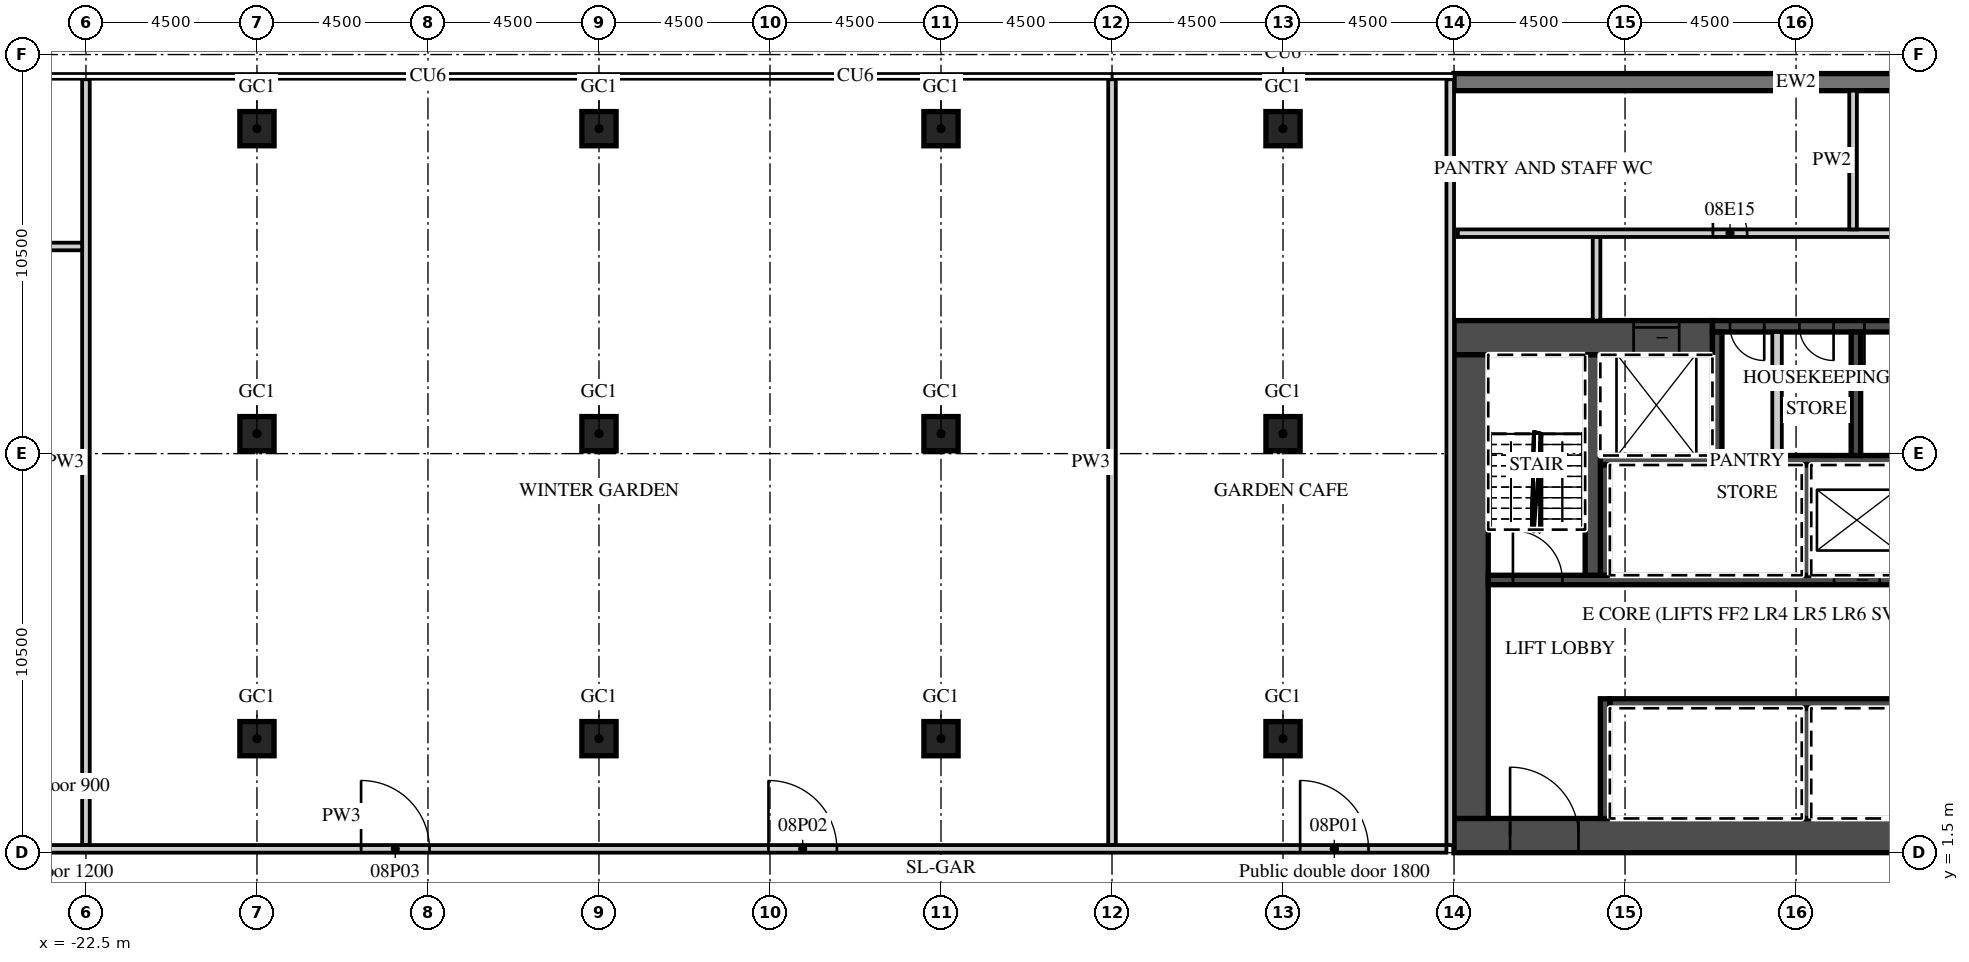
"""IFC4 building model, lengths in metres.
Left out: names, types, materials, properties, quantities, classifications, styles, units other than length and angle.
Written with IfcOpenShell. Run it as: python <this file> out.ifc"""

import sys

from ifc_helpers import new_model, si_unit, direction, frame, frame_2d, origin, origin_2d, place, context, subcontext, project, spatial, rectangle, extrude, element, fill, save


model = new_model("IFC4")
c1 = context("Model", 3, precision=1e-05, world=origin(), true_north=direction((0.0, 1.0)))
c2 = subcontext(c1, "Body", "Model", "MODEL_VIEW")
j1 = project(units=[si_unit("LENGTHUNIT", "METRE"), si_unit("PLANEANGLEUNIT", "RADIAN")], contexts=[c1])
p1 = place(None, origin())
s1 = spatial("IfcSite", under=j1, at=p1, CompositionType="ELEMENT")
p2 = place(p1, origin())
s2 = spatial("IfcBuilding", under=s1, at=p2, CompositionType="ELEMENT")
p3 = place(p2, frame((0.0, 0.0, 53.0)))
s3 = spatial("IfcBuildingStorey", under=s2, at=p3, CompositionType="ELEMENT", Elevation=53.0)
for number, where, z_axis, x_axis in (
    (1, (-18.0, 4.5, 0.0), (0.0, 0.0, 1.0), (1.0, 0.0, 0.0)),
    (2, (-18.0, 12.525, 0.0), (0.0, 0.0, 1.0), (1.0, 0.0, 0.0)),
    (3, (-18.0, 20.55, 0.0), (0.0, 0.0, 1.0), (1.0, 0.0, 0.0)),
    (4, (-9.0, 4.5, 0.0), (0.0, 0.0, 1.0), (1.0, 0.0, 0.0)),
    (5, (-9.0, 12.525, 0.0), (0.0, 0.0, 1.0), (1.0, 0.0, 0.0)),
    (6, (-9.0, 20.55, 0.0), (0.0, 0.0, 1.0), (1.0, 0.0, 0.0)),
    (7, (0.0, 4.5, 0.0), (0.0, 0.0, 1.0), (1.0, 0.0, 0.0)),
    (8, (0.0, 12.525, 0.0), (0.0, 0.0, 1.0), (1.0, 0.0, 0.0)),
    (9, (0.0, 20.55, 0.0), (0.0, 0.0, 1.0), (1.0, 0.0, 0.0)),
    (10, (9.0, 4.5, 0.0), (0.0, 0.0, 1.0), (1.0, 0.0, 0.0)),
    (11, (9.0, 12.525, 0.0), (0.0, 0.0, 1.0), (1.0, 0.0, 0.0)),
    (12, (9.0, 20.55, 0.0), (0.0, 0.0, 1.0), (1.0, 0.0, 0.0)),
):
    element("IfcColumn", number, at=place(p3, frame(where, z_axis=z_axis, x_axis=x_axis)), inside=s3, PredefinedType="COLUMN", context=c2, shape_type="SweptSolid", body=[
        extrude(rectangle(XDim=0.9, YDim=0.9, at=origin_2d()), origin(), (0.0, 0.0, 1.0), 5.72),
    ])
p4 = place(p3, frame((31.5, 21.775, 0.0), z_axis=(0.0, 0.0, 1.0), x_axis=(-1.0, 0.0, 0.0)))
e13 = element("IfcWall", 13, at=p4, inside=s3, PredefinedType="SOLIDWALL", context=c2, shape_type="SweptSolid", body=[
    extrude(rectangle(XDim=18.0, YDim=0.45, at=frame_2d((9.0, 0.0))), origin(), (0.0, 0.0, 1.0), 6.72),
])
p5 = place(p3, frame((13.5, 1.95, 0.0), z_axis=(0.0, 0.0, 1.0), x_axis=(1.0, 0.0, 0.0)))
e14 = element("IfcWall", 14, at=p5, inside=s3, PredefinedType="SHEAR", context=c2, shape_type="SweptSolid", body=[
    extrude(rectangle(XDim=18.0, YDim=0.9, at=frame_2d((9.0, 0.0))), origin(), (0.0, 0.0, 1.0), 6.72),
])
p6 = place(p5, frame((1.475, 0.0, 0.0)))
e15 = element("IfcOpeningElement", 15, at=p6, cuts=e14, PredefinedType="OPENING", context=c2, shape_type="SweptSolid", body=[
    extrude(rectangle(XDim=1.8, YDim=2.1, at=frame_2d((0.9, 1.05))), frame((0.0, 0.46, 0.0), z_axis=(0.0, -1.0, 0.0), x_axis=(1.0, 0.0, 0.0)), (0.0, 0.0, 1.0), 0.92),
])
p7 = place(p3, frame((13.5, 15.05, 0.0), z_axis=(0.0, 0.0, 1.0), x_axis=(1.0, 0.0, 0.0)))
e16 = element("IfcWall", 16, at=p7, inside=s3, PredefinedType="SHEAR", context=c2, shape_type="SweptSolid", body=[
    extrude(rectangle(XDim=6.8, YDim=0.9, at=frame_2d((3.4, 0.0))), origin(), (0.0, 0.0, 1.0), 6.72),
])
p8 = place(p7, frame((4.725, 0.0, 0.0)))
e17 = element("IfcOpeningElement", 17, at=p8, cuts=e16, PredefinedType="OPENING", context=c2, shape_type="SweptSolid", body=[
    extrude(rectangle(XDim=1.2, YDim=2.1, at=frame_2d((0.6, 1.05))), frame((0.0, 0.46, 0.0), z_axis=(0.0, -1.0, 0.0), x_axis=(1.0, 0.0, 0.0)), (0.0, 0.0, 1.0), 0.92),
])
p9 = place(p3, frame((20.3, 15.35, 0.0), z_axis=(0.0, 0.0, 1.0), x_axis=(1.0, 0.0, 0.0)))
e18 = element("IfcWall", 18, at=p9, inside=s3, PredefinedType="SHEAR", context=c2, shape_type="SweptSolid", body=[
    extrude(rectangle(XDim=10.3, YDim=0.3, at=frame_2d((5.15, 0.0))), origin(), (0.0, 0.0, 1.0), 6.72),
])
p10 = place(p9, frame((4.0, 0.0, 0.0)))
e19 = element("IfcOpeningElement", 19, at=p10, cuts=e18, PredefinedType="OPENING", context=c2, shape_type="SweptSolid", body=[
    extrude(rectangle(XDim=1.3, YDim=2.1, at=frame_2d((0.65, 1.05))), frame((0.0, 0.16, 0.0), z_axis=(0.0, -1.0, 0.0), x_axis=(1.0, 0.0, 0.0)), (0.0, 0.0, 1.0), 0.32),
])
p11 = place(p9, frame((2.288, 0.0, 0.0)))
e20 = element("IfcOpeningElement", 20, at=p11, cuts=e18, PredefinedType="OPENING", context=c2, shape_type="SweptSolid", body=[
    extrude(rectangle(XDim=0.9, YDim=2.1, at=frame_2d((0.45, 1.05))), frame((0.0, 0.16, 0.0), z_axis=(0.0, -1.0, 0.0), x_axis=(1.0, 0.0, 0.0)), (0.0, 0.0, 1.0), 0.32),
])
p12 = place(p9, frame((0.462, 0.0, 0.0)))
e21 = element("IfcOpeningElement", 21, at=p12, cuts=e18, PredefinedType="OPENING", context=c2, shape_type="SweptSolid", body=[
    extrude(rectangle(XDim=0.9, YDim=2.1, at=frame_2d((0.45, 1.05))), frame((0.0, 0.16, 0.0), z_axis=(0.0, -1.0, 0.0), x_axis=(1.0, 0.0, 0.0)), (0.0, 0.0, 1.0), 0.32),
])
p13 = place(p3, frame((13.95, 2.4, 0.0), z_axis=(0.0, 0.0, 1.0), x_axis=(0.0, 1.0, 0.0)))
e22 = element("IfcWall", 22, at=p13, inside=s3, PredefinedType="SHEAR", context=c2, shape_type="SweptSolid", body=[
    extrude(rectangle(XDim=12.2, YDim=0.9, at=frame_2d((6.1, 0.0))), origin(), (0.0, 0.0, 1.0), 6.72),
])
p14 = place(p3, frame((17.6, 5.425, 0.0), z_axis=(0.0, 0.0, 1.0), x_axis=(1.0, 0.0, 0.0)))
e23 = element("IfcWall", 23, at=p14, inside=s3, PredefinedType="SHEAR", context=c2, shape_type="SweptSolid", body=[
    extrude(rectangle(XDim=13.0, YDim=0.25, at=frame_2d((6.5, 0.0))), origin(), (0.0, 0.0, 1.0), 6.72),
])
p15 = place(p3, frame((17.475, 2.4, 0.0), z_axis=(0.0, 0.0, 1.0), x_axis=(0.0, 1.0, 0.0)))
e24 = element("IfcWall", 24, at=p15, inside=s3, PredefinedType="SHEAR", context=c2, shape_type="SweptSolid", body=[
    extrude(rectangle(XDim=3.15, YDim=0.25, at=frame_2d((1.575, 0.0))), origin(), (0.0, 0.0, 1.0), 6.72),
])
p16 = place(p3, frame((22.775, 2.4, 0.0), z_axis=(0.0, 0.0, 1.0), x_axis=(0.0, 1.0, 0.0)))
e25 = element("IfcWall", 25, at=p16, inside=s3, PredefinedType="SHEAR", context=c2, shape_type="SweptSolid", body=[
    extrude(rectangle(XDim=2.9, YDim=0.25, at=frame_2d((1.45, 0.0))), origin(), (0.0, 0.0, 1.0), 6.72),
])
p17 = place(p3, frame((14.4, 8.675, 0.0), z_axis=(0.0, 0.0, 1.0), x_axis=(1.0, 0.0, 0.0)))
e26 = element("IfcWall", 26, at=p17, inside=s3, PredefinedType="SHEAR", context=c2, shape_type="SweptSolid", body=[
    extrude(rectangle(XDim=16.2, YDim=0.25, at=frame_2d((8.1, 0.0))), origin(), (0.0, 0.0, 1.0), 6.72),
])
p18 = place(p17, frame((14.4, 0.0, 0.0)))
e27 = element("IfcOpeningElement", 27, at=p18, cuts=e26, PredefinedType="OPENING", context=c2, shape_type="SweptSolid", body=[
    extrude(rectangle(XDim=1.2, YDim=2.1, at=frame_2d((0.6, 1.05))), frame((0.0, 0.135, 0.0), z_axis=(0.0, -1.0, 0.0), x_axis=(1.0, 0.0, 0.0)), (0.0, 0.0, 1.0), 0.27),
])
p19 = place(p17, frame((11.75, 0.0, 0.0)))
e28 = element("IfcOpeningElement", 28, at=p19, cuts=e26, PredefinedType="OPENING", context=c2, shape_type="SweptSolid", body=[
    extrude(rectangle(XDim=1.2, YDim=2.1, at=frame_2d((0.6, 1.05))), frame((0.0, 0.135, 0.0), z_axis=(0.0, -1.0, 0.0), x_axis=(1.0, 0.0, 0.0)), (0.0, 0.0, 1.0), 0.27),
])
p20 = place(p17, frame((9.1, 0.0, 0.0)))
e29 = element("IfcOpeningElement", 29, at=p20, cuts=e26, PredefinedType="OPENING", context=c2, shape_type="SweptSolid", body=[
    extrude(rectangle(XDim=1.2, YDim=2.1, at=frame_2d((0.6, 1.05))), frame((0.0, 0.135, 0.0), z_axis=(0.0, -1.0, 0.0), x_axis=(1.0, 0.0, 0.0)), (0.0, 0.0, 1.0), 0.27),
])
p21 = place(p17, frame((0.65, 0.0, 0.0)))
e30 = element("IfcOpeningElement", 30, at=p21, cuts=e26, PredefinedType="OPENING", context=c2, shape_type="SweptSolid", body=[
    extrude(rectangle(XDim=1.3, YDim=2.1, at=frame_2d((0.65, 1.05))), frame((0.0, 0.135, 0.0), z_axis=(0.0, -1.0, 0.0), x_axis=(1.0, 0.0, 0.0)), (0.0, 0.0, 1.0), 0.27),
])
p22 = place(p3, frame((17.35, 11.825, 0.0), z_axis=(0.0, 0.0, 1.0), x_axis=(1.0, 0.0, 0.0)))
e31 = element("IfcWall", 31, at=p22, inside=s3, PredefinedType="SHEAR", context=c2, shape_type="SweptSolid", body=[
    extrude(rectangle(XDim=13.25, YDim=0.25, at=frame_2d((6.625, 0.0))), origin(), (0.0, 0.0, 1.0), 6.72),
])
for number, where, z_axis, x_axis in (
    (32, (17.475, 8.8, 0.0), (0.0, 0.0, 1.0), (0.0, 1.0, 0.0)),
    (33, (22.775, 8.8, 0.0), (0.0, 0.0, 1.0), (0.0, 1.0, 0.0)),
):
    element("IfcWall", number, at=place(p3, frame(where, z_axis=z_axis, x_axis=x_axis)), inside=s3, PredefinedType="SHEAR", context=c2, shape_type="SweptSolid", body=[
        extrude(rectangle(XDim=2.9, YDim=0.25, at=frame_2d((1.45, 0.0))), origin(), (0.0, 0.0, 1.0), 6.72),
    ])
p23 = place(p3, frame((17.15, 8.8, 0.0), z_axis=(0.0, 0.0, 1.0), x_axis=(0.0, 1.0, 0.0)))
e34 = element("IfcWall", 34, at=p23, inside=s3, PredefinedType="SHEAR", context=c2, shape_type="SweptSolid", body=[
    extrude(rectangle(XDim=5.8, YDim=0.4, at=frame_2d((2.9, 0.0))), origin(), (0.0, 0.0, 1.0), 6.72),
])
for number, where, z_axis, x_axis in (
    (35, (20.425, 11.95, 0.0), (0.0, 0.0, 1.0), (0.0, 1.0, 0.0)),
    (36, (24.075, 11.95, 0.0), (0.0, 0.0, 1.0), (0.0, 1.0, 0.0)),
):
    element("IfcWall", number, at=place(p3, frame(where, z_axis=z_axis, x_axis=x_axis)), inside=s3, PredefinedType="SHEAR", context=c2, shape_type="SweptSolid", body=[
        extrude(rectangle(XDim=3.25, YDim=0.25, at=frame_2d((1.625, 0.0))), origin(), (0.0, 0.0, 1.0), 6.72),
    ])
p24 = place(p3, frame((22.0, 11.95, 0.0), z_axis=(0.0, 0.0, 1.0), x_axis=(0.0, 1.0, 0.0)))
e37 = element("IfcWall", 37, at=p24, inside=s3, PredefinedType="PARTITIONING", context=c2, shape_type="SweptSolid", body=[
    extrude(rectangle(XDim=3.25, YDim=0.25, at=frame_2d((1.625, 0.0))), origin(), (0.0, 0.0, 1.0), 6.72),
])
p25 = place(p3, frame((17.25, 15.5, 0.0), z_axis=(0.0, 0.0, 1.0), x_axis=(0.0, 1.0, 0.0)))
e38 = element("IfcWall", 38, at=p25, inside=s3, PredefinedType="PARTITIONING", context=c2, shape_type="SweptSolid", body=[
    extrude(rectangle(XDim=2.2, YDim=0.2, at=frame_2d((1.1, 0.0))), origin(), (0.0, 0.0, 1.0), 6.72),
])
p26 = place(p3, frame((13.6, 17.8, 0.0), z_axis=(0.0, 0.0, 1.0), x_axis=(1.0, 0.0, 0.0)))
e39 = element("IfcWall", 39, at=p26, inside=s3, PredefinedType="PARTITIONING", context=c2, shape_type="SweptSolid", body=[
    extrude(rectangle(XDim=31.25, YDim=0.2, at=frame_2d((15.625, 0.0))), origin(), (0.0, 0.0, 1.0), 6.72),
])
p27 = place(p26, frame((15.012, 0.0, 0.0)))
e40 = element("IfcOpeningElement", 40, at=p27, cuts=e39, PredefinedType="OPENING", context=c2, shape_type="SweptSolid", body=[
    extrude(rectangle(XDim=0.9, YDim=2.1, at=frame_2d((0.45, 1.05))), frame((0.0, 0.11, 0.0), z_axis=(0.0, -1.0, 0.0), x_axis=(1.0, 0.0, 0.0)), (0.0, 0.0, 1.0), 0.22),
])
p28 = place(p26, frame((6.712, 0.0, 0.0)))
e41 = element("IfcOpeningElement", 41, at=p28, cuts=e39, PredefinedType="OPENING", context=c2, shape_type="SweptSolid", body=[
    extrude(rectangle(XDim=0.9, YDim=2.1, at=frame_2d((0.45, 1.05))), frame((0.0, 0.11, 0.0), z_axis=(0.0, -1.0, 0.0), x_axis=(1.0, 0.0, 0.0)), (0.0, 0.0, 1.0), 0.22),
])
p29 = place(p3, frame((24.0, 17.9, 0.0), z_axis=(0.0, 0.0, 1.0), x_axis=(0.0, 1.0, 0.0)))
e42 = element("IfcWall", 42, at=p29, inside=s3, PredefinedType="PARTITIONING", context=c2, shape_type="SweptSolid", body=[
    extrude(rectangle(XDim=3.65, YDim=0.2, at=frame_2d((1.825, 0.0))), origin(), (0.0, 0.0, 1.0), 6.72),
])
for number, where, z_axis, x_axis in (
    (43, (4.5, 1.7, 0.0), (0.0, 0.0, 1.0), (0.0, 1.0, 0.0)),
    (44, (-22.5, 1.7, 0.0), (0.0, 0.0, 1.0), (0.0, 1.0, 0.0)),
):
    element("IfcWall", number, at=place(p3, frame(where, z_axis=z_axis, x_axis=x_axis)), inside=s3, PredefinedType="PARTITIONING", context=c2, shape_type="SweptSolid", body=[
        extrude(rectangle(XDim=20.15, YDim=0.2, at=frame_2d((10.075, 0.0))), origin(), (0.0, 0.0, 1.0), 6.72),
    ])
p30 = place(p3, frame((-31.4, 17.45, 0.0), z_axis=(0.0, 0.0, 1.0), x_axis=(1.0, 0.0, 0.0)))
e45 = element("IfcWall", 45, at=p30, inside=s3, PredefinedType="PARTITIONING", context=c2, shape_type="SweptSolid", body=[
    extrude(rectangle(XDim=8.8, YDim=0.2, at=frame_2d((4.4, 0.0))), origin(), (0.0, 0.0, 1.0), 5.72),
])
p31 = place(p30, frame((5.5, 0.0, 0.0)))
e46 = element("IfcOpeningElement", 46, at=p31, cuts=e45, PredefinedType="OPENING", context=c2, shape_type="SweptSolid", body=[
    extrude(rectangle(XDim=0.9, YDim=2.1, at=frame_2d((0.45, 1.05))), frame((0.0, 0.11, 0.0), z_axis=(0.0, -1.0, 0.0), x_axis=(1.0, 0.0, 0.0)), (0.0, 0.0, 1.0), 0.22),
])
p32 = place(p3, frame((-44.85, 1.6, 0.0), z_axis=(0.0, 0.0, 1.0), x_axis=(1.0, 0.0, 0.0)))
e47 = element("IfcWall", 47, at=p32, inside=s3, PredefinedType="PARTITIONING", context=c2, shape_type="SweptSolid", body=[
    extrude(rectangle(XDim=58.15, YDim=0.2, at=frame_2d((29.075, 0.0))), origin(), (0.0, 0.0, 1.0), 5.72),
])
p33 = place(p32, frame((54.3, 0.0, 0.0)))
e48 = element("IfcOpeningElement", 48, at=p33, cuts=e47, PredefinedType="OPENING", context=c2, shape_type="SweptSolid", body=[
    extrude(rectangle(XDim=1.8, YDim=2.1, at=frame_2d((0.9, 1.05))), frame((0.0, 0.11, 0.0), z_axis=(0.0, -1.0, 0.0), x_axis=(1.0, 0.0, 0.0)), (0.0, 0.0, 1.0), 0.22),
])
p34 = place(p32, frame((40.31, 0.0, 0.0)))
e49 = element("IfcOpeningElement", 49, at=p34, cuts=e47, PredefinedType="OPENING", context=c2, shape_type="SweptSolid", body=[
    extrude(rectangle(XDim=1.8, YDim=2.1, at=frame_2d((0.9, 1.05))), frame((0.0, 0.11, 0.0), z_axis=(0.0, -1.0, 0.0), x_axis=(1.0, 0.0, 0.0)), (0.0, 0.0, 1.0), 0.22),
])
p35 = place(p32, frame((29.59, 0.0, 0.0)))
e50 = element("IfcOpeningElement", 50, at=p35, cuts=e47, PredefinedType="OPENING", context=c2, shape_type="SweptSolid", body=[
    extrude(rectangle(XDim=1.8, YDim=2.1, at=frame_2d((0.9, 1.05))), frame((0.0, 0.11, 0.0), z_axis=(0.0, -1.0, 0.0), x_axis=(1.0, 0.0, 0.0)), (0.0, 0.0, 1.0), 0.22),
])
p36 = place(p32, frame((19.825, 0.0, 0.0)))
e51 = element("IfcOpeningElement", 51, at=p36, cuts=e47, PredefinedType="OPENING", context=c2, shape_type="SweptSolid", body=[
    extrude(rectangle(XDim=1.2, YDim=2.1, at=frame_2d((0.6, 1.05))), frame((0.0, 0.11, 0.0), z_axis=(0.0, -1.0, 0.0), x_axis=(1.0, 0.0, 0.0)), (0.0, 0.0, 1.0), 0.22),
])
p37 = place(p32, frame((9.265, 0.0, 0.0)))
e52 = element("IfcOpeningElement", 52, at=p37, cuts=e47, PredefinedType="OPENING", context=c2, shape_type="SweptSolid", body=[
    extrude(rectangle(XDim=1.8, YDim=2.1, at=frame_2d((0.9, 1.05))), frame((0.0, 0.11, 0.0), z_axis=(0.0, -1.0, 0.0), x_axis=(1.0, 0.0, 0.0)), (0.0, 0.0, 1.0), 0.22),
])
p38 = place(p32, frame((2.085, 0.0, 0.0)))
e53 = element("IfcOpeningElement", 53, at=p38, cuts=e47, PredefinedType="OPENING", context=c2, shape_type="SweptSolid", body=[
    extrude(rectangle(XDim=1.8, YDim=2.1, at=frame_2d((0.9, 1.05))), frame((0.0, 0.11, 0.0), z_axis=(0.0, -1.0, 0.0), x_axis=(1.0, 0.0, 0.0)), (0.0, 0.0, 1.0), 0.22),
])
p39 = place(p3, frame((13.4, 1.7, 0.0), z_axis=(0.0, 0.0, 1.0), x_axis=(0.0, 1.0, 0.0)))
e54 = element("IfcWall", 54, at=p39, inside=s3, PredefinedType="PARTITIONING", context=c2, shape_type="SweptSolid", body=[
    extrude(rectangle(XDim=20.15, YDim=0.2, at=frame_2d((10.075, 0.0))), origin(), (0.0, 0.0, 1.0), 6.72),
])
p40 = place(p20, origin())
e55 = element("IfcDoor", 55, at=p40, inside=s3, OperationType="SLIDING_TO_RIGHT", PredefinedType="DOOR", context=c2, shape_type="SweptSolid", body=[
    extrude(rectangle(XDim=1.2, YDim=2.1, at=frame_2d((0.6, 1.05))), frame((0.0, 0.025, 0.0), z_axis=(0.0, -1.0, 0.0), x_axis=(1.0, 0.0, 0.0)), (0.0, 0.0, 1.0), 0.05),
])
fill(e29, e55)
p41 = place(p8, origin())
e56 = element("IfcDoor", 56, at=p41, inside=s3, OperationType="SLIDING_TO_LEFT", PredefinedType="DOOR", context=c2, shape_type="SweptSolid", body=[
    extrude(rectangle(XDim=1.2, YDim=2.1, at=frame_2d((0.6, 1.05))), frame((0.0, 0.025, 0.0), z_axis=(0.0, -1.0, 0.0), x_axis=(1.0, 0.0, 0.0)), (0.0, 0.0, 1.0), 0.05),
])
fill(e17, e56)
p42 = place(p6, origin())
e57 = element("IfcDoor", 57, at=p42, inside=s3, OperationType="DOUBLE_DOOR_DOUBLE_SWING", PredefinedType="DOOR", context=c2, shape_type="SweptSolid", body=[
    extrude(rectangle(XDim=1.8, YDim=2.1, at=frame_2d((0.9, 1.05))), frame((0.0, 0.025, 0.0), z_axis=(0.0, -1.0, 0.0), x_axis=(1.0, 0.0, 0.0)), (0.0, 0.0, 1.0), 0.05),
])
fill(e15, e57)
p43 = place(p21, origin())
e58 = element("IfcDoor", 58, at=p43, inside=s3, OperationType="SINGLE_SWING_LEFT", PredefinedType="DOOR", context=c2, shape_type="SweptSolid", body=[
    extrude(rectangle(XDim=1.3, YDim=2.1, at=frame_2d((0.65, 1.05))), frame((0.0, 0.025, 0.0), z_axis=(0.0, -1.0, 0.0), x_axis=(1.0, 0.0, 0.0)), (0.0, 0.0, 1.0), 0.05),
])
fill(e30, e58)
p44 = place(p10, origin())
e59 = element("IfcDoor", 59, at=p44, inside=s3, OperationType="SINGLE_SWING_LEFT", PredefinedType="DOOR", context=c2, shape_type="SweptSolid", body=[
    extrude(rectangle(XDim=1.3, YDim=2.1, at=frame_2d((0.65, 1.05))), frame((0.0, 0.025, 0.0), z_axis=(0.0, -1.0, 0.0), x_axis=(1.0, 0.0, 0.0)), (0.0, 0.0, 1.0), 0.05),
])
fill(e19, e59)
p45 = place(p11, origin())
e60 = element("IfcDoor", 60, at=p45, inside=s3, OperationType="SINGLE_SWING_RIGHT", PredefinedType="DOOR", context=c2, shape_type="SweptSolid", body=[
    extrude(rectangle(XDim=0.9, YDim=2.1, at=frame_2d((0.45, 1.05))), frame((0.0, 0.025, 0.0), z_axis=(0.0, -1.0, 0.0), x_axis=(1.0, 0.0, 0.0)), (0.0, 0.0, 1.0), 0.05),
])
fill(e20, e60)
p46 = place(p12, origin())
e61 = element("IfcDoor", 61, at=p46, inside=s3, OperationType="SINGLE_SWING_RIGHT", PredefinedType="DOOR", context=c2, shape_type="SweptSolid", body=[
    extrude(rectangle(XDim=0.9, YDim=2.1, at=frame_2d((0.45, 1.05))), frame((0.0, 0.025, 0.0), z_axis=(0.0, -1.0, 0.0), x_axis=(1.0, 0.0, 0.0)), (0.0, 0.0, 1.0), 0.05),
])
fill(e21, e61)
p47 = place(p28, origin())
e62 = element("IfcDoor", 62, at=p47, inside=s3, OperationType="SINGLE_SWING_LEFT", PredefinedType="DOOR", context=c2, shape_type="SweptSolid", body=[
    extrude(rectangle(XDim=0.9, YDim=2.1, at=frame_2d((0.45, 1.05))), frame((0.0, 0.025, 0.0), z_axis=(0.0, -1.0, 0.0), x_axis=(1.0, 0.0, 0.0)), (0.0, 0.0, 1.0), 0.05),
])
fill(e41, e62)
p48 = place(p33, origin())
e63 = element("IfcDoor", 63, at=p48, inside=s3, OperationType="DOUBLE_DOOR_DOUBLE_SWING", PredefinedType="DOOR", context=c2, shape_type="SweptSolid", body=[
    extrude(rectangle(XDim=1.8, YDim=2.1, at=frame_2d((0.9, 1.05))), frame((0.0, 0.025, 0.0), z_axis=(0.0, -1.0, 0.0), x_axis=(1.0, 0.0, 0.0)), (0.0, 0.0, 1.0), 0.05),
])
fill(e48, e63)
p49 = place(p34, origin())
e64 = element("IfcDoor", 64, at=p49, inside=s3, OperationType="DOUBLE_DOOR_DOUBLE_SWING", PredefinedType="DOOR", context=c2, shape_type="SweptSolid", body=[
    extrude(rectangle(XDim=1.8, YDim=2.1, at=frame_2d((0.9, 1.05))), frame((0.0, 0.025, 0.0), z_axis=(0.0, -1.0, 0.0), x_axis=(1.0, 0.0, 0.0)), (0.0, 0.0, 1.0), 0.05),
])
fill(e49, e64)
p50 = place(p35, origin())
e65 = element("IfcDoor", 65, at=p50, inside=s3, OperationType="DOUBLE_DOOR_DOUBLE_SWING", PredefinedType="DOOR", context=c2, shape_type="SweptSolid", body=[
    extrude(rectangle(XDim=1.8, YDim=2.1, at=frame_2d((0.9, 1.05))), frame((0.0, 0.025, 0.0), z_axis=(0.0, -1.0, 0.0), x_axis=(1.0, 0.0, 0.0)), (0.0, 0.0, 1.0), 0.05),
])
fill(e50, e65)
save(model, sys.argv[1])
